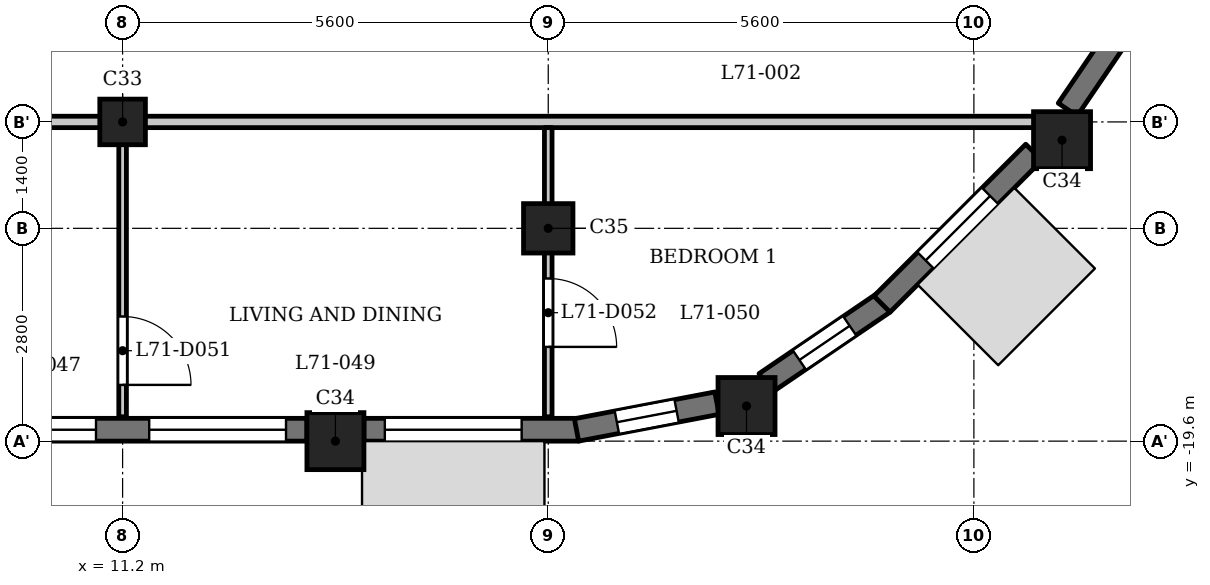
"""IFC4 building model, lengths in metres.
Left out: names, types, materials, properties, quantities, classifications, styles, units other than length and angle.
Written with IfcOpenShell. Run it as: python <this file> out.ifc"""

import sys

from ifc_helpers import new_model, si_unit, direction, frame, frame_2d, origin, origin_2d, place, context, subcontext, project, spatial, rectangle, extrude, element, fill, save


model = new_model("IFC4")
c1 = context("Model", 3, precision=1e-05, world=origin(), true_north=direction((0.0, 1.0)))
c2 = subcontext(c1, "Body", "Model", "MODEL_VIEW")
j1 = project(units=[si_unit("LENGTHUNIT", "METRE"), si_unit("PLANEANGLEUNIT", "RADIAN")], contexts=[c1])
p1 = place(None, origin())
s1 = spatial("IfcSite", under=j1, at=p1, CompositionType="ELEMENT")
p2 = place(p1, origin())
s2 = spatial("IfcBuilding", under=s1, at=p2, CompositionType="ELEMENT")
p3 = place(p2, frame((0.0, 0.0, 273.2)))
s3 = spatial("IfcBuildingStorey", under=s2, at=p3, CompositionType="ELEMENT", Elevation=273.2)
for number, where, z_axis, x_axis in (
    (1, (14.0, -19.6, 0.0), (0.0, 0.0, 1.0), (1.0, 0.0, 0.0)),
    (2, (19.409, -19.138, 0.0), (0.0, 0.0, 1.0), (1.0, 0.0, 0.0)),
    (3, (23.56, -15.64, 0.0), (0.0, 0.0, 1.0), (1.0, 0.0, 0.0)),
):
    element("IfcColumn", number, at=place(p3, frame(where, z_axis=z_axis, x_axis=x_axis)), inside=s3, PredefinedType="COLUMN", context=c2, shape_type="SweptSolid", body=[
        extrude(rectangle(XDim=0.75, YDim=0.75, at=origin_2d()), origin(), (0.0, 0.0, 1.0), 3.5),
    ])
p4 = place(p3, frame((16.8, -16.8, 0.0), z_axis=(0.0, 0.0, 1.0), x_axis=(1.0, 0.0, 0.0)))
e4 = element("IfcColumn", 4, at=p4, inside=s3, PredefinedType="COLUMN", context=c2, shape_type="SweptSolid", body=[
    extrude(rectangle(XDim=0.65, YDim=0.65, at=origin_2d()), origin(), (0.0, 0.0, 1.0), 3.5),
])
p5 = place(p3, frame((11.2, -15.4, 0.0), z_axis=(0.0, 0.0, 1.0), x_axis=(1.0, 0.0, 0.0)))
e5 = element("IfcColumn", 5, at=p5, inside=s3, PredefinedType="COLUMN", context=c2, shape_type="SweptSolid", body=[
    extrude(rectangle(XDim=0.6, YDim=0.6, at=origin_2d()), origin(), (0.0, 0.0, 1.0), 3.5),
])
p6 = place(p3, frame((8.775, -19.45, 0.0), z_axis=(0.0, 0.0, 1.0), x_axis=(1.0, 0.0, 0.0)))
e6 = element("IfcWall", 6, at=p6, inside=s3, PredefinedType="SOLIDWALL", context=c2, shape_type="SweptSolid", body=[
    extrude(rectangle(XDim=4.85, YDim=0.3, at=frame_2d((2.425, 0.0))), origin(), (0.0, 0.0, 1.0), 2.55),
])
p7 = place(p6, frame((0.275, 0.0, 0.9)))
e7 = element("IfcOpeningElement", 7, at=p7, cuts=e6, PredefinedType="OPENING", context=c2, shape_type="SweptSolid", body=[
    extrude(rectangle(XDim=1.8, YDim=1.25, at=frame_2d((0.9, 0.625))), frame((0.0, 0.16, 0.0), z_axis=(0.0, -1.0, 0.0), x_axis=(1.0, 0.0, 0.0)), (0.0, 0.0, 1.0), 0.32),
])
p8 = place(p6, frame((2.775, 0.0, 0.9)))
e8 = element("IfcOpeningElement", 8, at=p8, cuts=e6, PredefinedType="OPENING", context=c2, shape_type="SweptSolid", body=[
    extrude(rectangle(XDim=1.8, YDim=1.25, at=frame_2d((0.9, 0.625))), frame((0.0, 0.16, 0.0), z_axis=(0.0, -1.0, 0.0), x_axis=(1.0, 0.0, 0.0)), (0.0, 0.0, 1.0), 0.32),
])
p9 = place(p3, frame((14.375, -19.45, 0.0), z_axis=(0.0, 0.0, 1.0), x_axis=(1.0, 0.0, 0.0)))
e9 = element("IfcWall", 9, at=p9, inside=s3, PredefinedType="SOLIDWALL", context=c2, shape_type="SweptSolid", body=[
    extrude(rectangle(XDim=2.825, YDim=0.3, at=frame_2d((1.413, 0.0))), origin(), (0.0, 0.0, 1.0), 2.55),
])
p10 = place(p9, frame((0.275, 0.0, 0.9)))
e10 = element("IfcOpeningElement", 10, at=p10, cuts=e9, PredefinedType="OPENING", context=c2, shape_type="SweptSolid", body=[
    extrude(rectangle(XDim=1.8, YDim=1.25, at=frame_2d((0.9, 0.625))), frame((0.0, 0.16, 0.0), z_axis=(0.0, -1.0, 0.0), x_axis=(1.0, 0.0, 0.0)), (0.0, 0.0, 1.0), 0.32),
])
p11 = place(p3, frame((17.172, -19.453, 0.0), z_axis=(0.0, 0.0, 1.0), x_axis=(0.982284001233, 0.187398348234, 0.0)))
e11 = element("IfcWall", 11, at=p11, inside=s3, PredefinedType="SOLIDWALL", context=c2, shape_type="SweptSolid", body=[
    extrude(rectangle(XDim=1.881, YDim=0.3, at=frame_2d((0.941, 0.0))), origin(), (0.0, 0.0, 1.0), 2.55),
])
p12 = place(p11, frame((0.541, 0.0, 0.6)))
e12 = element("IfcOpeningElement", 12, at=p12, cuts=e11, PredefinedType="OPENING", context=c2, shape_type="SweptSolid", body=[
    extrude(rectangle(XDim=0.8, YDim=1.55, at=frame_2d((0.4, 0.775))), frame((0.0, 0.16, 0.0), z_axis=(0.0, -1.0, 0.0), x_axis=(1.0, 0.0, 0.0)), (0.0, 0.0, 1.0), 0.32),
])
p13 = place(p3, frame((19.657, -18.836, 0.0), z_axis=(0.0, 0.0, 1.0), x_axis=(0.82704477487, 0.562136051469, 0.0)))
e13 = element("IfcWall", 13, at=p13, inside=s3, PredefinedType="SOLIDWALL", context=c2, shape_type="SweptSolid", body=[
    extrude(rectangle(XDim=1.881, YDim=0.3, at=frame_2d((0.94, 0.0))), origin(), (0.0, 0.0, 1.0), 2.55),
])
p14 = place(p13, frame((0.541, 0.0, 0.6)))
e14 = element("IfcOpeningElement", 14, at=p14, cuts=e13, PredefinedType="OPENING", context=c2, shape_type="SweptSolid", body=[
    extrude(rectangle(XDim=0.8, YDim=1.55, at=frame_2d((0.4, 0.775))), frame((0.0, 0.16, 0.0), z_axis=(0.0, -1.0, 0.0), x_axis=(1.0, 0.0, 0.0)), (0.0, 0.0, 1.0), 0.32),
])
p15 = place(p3, frame((21.191, -17.797, 0.0), z_axis=(0.0, 0.0, 1.0), x_axis=(0.707106781187, 0.707106781187, 0.0)))
e15 = element("IfcWall", 15, at=p15, inside=s3, PredefinedType="SOLIDWALL", context=c2, shape_type="SweptSolid", body=[
    extrude(rectangle(XDim=2.825, YDim=0.3, at=frame_2d((1.413, 0.0))), origin(), (0.0, 0.0, 1.0), 2.55),
])
p16 = place(p15, frame((0.812, 0.0, 0.6)))
e16 = element("IfcOpeningElement", 16, at=p16, cuts=e15, PredefinedType="OPENING", context=c2, shape_type="SweptSolid", body=[
    extrude(rectangle(XDim=1.2, YDim=1.55, at=frame_2d((0.6, 0.775))), frame((0.0, 0.16, 0.0), z_axis=(0.0, -1.0, 0.0), x_axis=(1.0, 0.0, 0.0)), (0.0, 0.0, 1.0), 0.32),
])
p17 = place(p3, frame((23.634, -15.237, 0.0), z_axis=(0.0, 0.0, 1.0), x_axis=(0.562099454787, 0.827069648173, 0.0)))
e17 = element("IfcWall", 17, at=p17, inside=s3, PredefinedType="SOLIDWALL", context=c2, shape_type="SweptSolid", body=[
    extrude(rectangle(XDim=1.427, YDim=0.3, at=frame_2d((0.714, 0.0))), origin(), (0.0, 0.0, 1.0), 2.55),
])
p18 = place(p3, frame((-23.322, -15.4, 0.0), z_axis=(0.0, 0.0, 1.0), x_axis=(1.0, 0.0, 0.0)))
e18 = element("IfcWall", 18, at=p18, inside=s3, PredefinedType="PARTITIONING", context=c2, shape_type="SweptSolid", body=[
    extrude(rectangle(XDim=46.872, YDim=0.15, at=frame_2d((23.436, 0.0))), origin(), (0.0, 0.0, 1.0), 3.2),
])
p19 = place(p18, frame((8.172, 0.0, 0.0)))
e19 = element("IfcOpeningElement", 19, at=p19, cuts=e18, PredefinedType="OPENING", context=c2, shape_type="SweptSolid", body=[
    extrude(rectangle(XDim=1.0, YDim=2.1, at=frame_2d((0.5, 1.05))), frame((0.0, 0.085, 0.0), z_axis=(0.0, -1.0, 0.0), x_axis=(1.0, 0.0, 0.0)), (0.0, 0.0, 1.0), 0.17),
])
p20 = place(p18, frame((15.172, 0.0, 0.0)))
e20 = element("IfcOpeningElement", 20, at=p20, cuts=e18, PredefinedType="OPENING", context=c2, shape_type="SweptSolid", body=[
    extrude(rectangle(XDim=1.0, YDim=2.1, at=frame_2d((0.5, 1.05))), frame((0.0, 0.085, 0.0), z_axis=(0.0, -1.0, 0.0), x_axis=(1.0, 0.0, 0.0)), (0.0, 0.0, 1.0), 0.17),
])
p21 = place(p18, frame((31.972, 0.0, 0.0)))
e21 = element("IfcOpeningElement", 21, at=p21, cuts=e18, PredefinedType="OPENING", context=c2, shape_type="SweptSolid", body=[
    extrude(rectangle(XDim=1.0, YDim=2.1, at=frame_2d((0.5, 1.05))), frame((0.0, 0.085, 0.0), z_axis=(0.0, -1.0, 0.0), x_axis=(1.0, 0.0, 0.0)), (0.0, 0.0, 1.0), 0.17),
])
p22 = place(p3, frame((11.2, -19.28, 0.0), z_axis=(0.0, 0.0, 1.0), x_axis=(0.0, 1.0, 0.0)))
e22 = element("IfcWall", 22, at=p22, inside=s3, PredefinedType="PARTITIONING", context=c2, shape_type="SweptSolid", body=[
    extrude(rectangle(XDim=3.805, YDim=0.1, at=frame_2d((1.902, 0.0))), origin(), (0.0, 0.0, 1.0), 3.2),
])
p23 = place(p22, frame((0.42, 0.0, 0.0)))
e23 = element("IfcOpeningElement", 23, at=p23, cuts=e22, PredefinedType="OPENING", context=c2, shape_type="SweptSolid", body=[
    extrude(rectangle(XDim=0.9, YDim=2.1, at=frame_2d((0.45, 1.05))), frame((0.0, 0.06, 0.0), z_axis=(0.0, -1.0, 0.0), x_axis=(1.0, 0.0, 0.0)), (0.0, 0.0, 1.0), 0.12),
])
p24 = place(p3, frame((16.8, -19.28, 0.0), z_axis=(0.0, 0.0, 1.0), x_axis=(0.0, 1.0, 0.0)))
e24 = element("IfcWall", 24, at=p24, inside=s3, PredefinedType="PARTITIONING", context=c2, shape_type="SweptSolid", body=[
    extrude(rectangle(XDim=3.805, YDim=0.1, at=frame_2d((1.902, 0.0))), origin(), (0.0, 0.0, 1.0), 3.2),
])
p25 = place(p24, frame((0.92, 0.0, 0.0)))
e25 = element("IfcOpeningElement", 25, at=p25, cuts=e24, PredefinedType="OPENING", context=c2, shape_type="SweptSolid", body=[
    extrude(rectangle(XDim=0.9, YDim=2.1, at=frame_2d((0.45, 1.05))), frame((0.0, 0.06, 0.0), z_axis=(0.0, -1.0, 0.0), x_axis=(1.0, 0.0, 0.0)), (0.0, 0.0, 1.0), 0.12),
])
p26 = place(p23, origin())
e26 = element("IfcDoor", 26, at=p26, inside=s3, OperationType="SINGLE_SWING_LEFT", PredefinedType="DOOR", context=c2, shape_type="SweptSolid", body=[
    extrude(rectangle(XDim=0.9, YDim=2.1, at=frame_2d((0.45, 1.05))), frame((0.0, 0.025, 0.0), z_axis=(0.0, -1.0, 0.0), x_axis=(1.0, 0.0, 0.0)), (0.0, 0.0, 1.0), 0.05),
])
fill(e23, e26)
p27 = place(p25, origin())
e27 = element("IfcDoor", 27, at=p27, inside=s3, OperationType="SINGLE_SWING_LEFT", PredefinedType="DOOR", context=c2, shape_type="SweptSolid", body=[
    extrude(rectangle(XDim=0.9, YDim=2.1, at=frame_2d((0.45, 1.05))), frame((0.0, 0.025, 0.0), z_axis=(0.0, -1.0, 0.0), x_axis=(1.0, 0.0, 0.0)), (0.0, 0.0, 1.0), 0.05),
])
fill(e25, e27)
p28 = place(p7, origin())
e28 = element("IfcWindow", 28, at=p28, inside=s3, PartitioningType="SINGLE_PANEL", PredefinedType="WINDOW", context=c2, shape_type="SweptSolid", body=[
    extrude(rectangle(XDim=1.8, YDim=1.25, at=frame_2d((0.9, 0.625))), frame((0.0, 0.03, 0.0), z_axis=(0.0, -1.0, 0.0), x_axis=(1.0, 0.0, 0.0)), (0.0, 0.0, 1.0), 0.06),
])
fill(e7, e28)
p29 = place(p8, origin())
e29 = element("IfcWindow", 29, at=p29, inside=s3, PartitioningType="SINGLE_PANEL", PredefinedType="WINDOW", context=c2, shape_type="SweptSolid", body=[
    extrude(rectangle(XDim=1.8, YDim=1.25, at=frame_2d((0.9, 0.625))), frame((0.0, 0.03, 0.0), z_axis=(0.0, -1.0, 0.0), x_axis=(1.0, 0.0, 0.0)), (0.0, 0.0, 1.0), 0.06),
])
fill(e8, e29)
p30 = place(p10, origin())
e30 = element("IfcWindow", 30, at=p30, inside=s3, PartitioningType="SINGLE_PANEL", PredefinedType="WINDOW", context=c2, shape_type="SweptSolid", body=[
    extrude(rectangle(XDim=1.8, YDim=1.25, at=frame_2d((0.9, 0.625))), frame((0.0, 0.03, 0.0), z_axis=(0.0, -1.0, 0.0), x_axis=(1.0, 0.0, 0.0)), (0.0, 0.0, 1.0), 0.06),
])
fill(e10, e30)
p31 = place(p12, origin())
e31 = element("IfcWindow", 31, at=p31, inside=s3, PartitioningType="SINGLE_PANEL", PredefinedType="WINDOW", context=c2, shape_type="SweptSolid", body=[
    extrude(rectangle(XDim=0.8, YDim=1.55, at=frame_2d((0.4, 0.775))), frame((0.0, 0.03, 0.0), z_axis=(0.0, -1.0, 0.0), x_axis=(1.0, 0.0, 0.0)), (0.0, 0.0, 1.0), 0.06),
])
fill(e12, e31)
p32 = place(p14, origin())
e32 = element("IfcWindow", 32, at=p32, inside=s3, PartitioningType="SINGLE_PANEL", PredefinedType="WINDOW", context=c2, shape_type="SweptSolid", body=[
    extrude(rectangle(XDim=0.8, YDim=1.55, at=frame_2d((0.4, 0.775))), frame((0.0, 0.03, 0.0), z_axis=(0.0, -1.0, 0.0), x_axis=(1.0, 0.0, 0.0)), (0.0, 0.0, 1.0), 0.06),
])
fill(e14, e32)
p33 = place(p16, origin())
e33 = element("IfcWindow", 33, at=p33, inside=s3, PartitioningType="SINGLE_PANEL", PredefinedType="WINDOW", context=c2, shape_type="SweptSolid", body=[
    extrude(rectangle(XDim=1.2, YDim=1.55, at=frame_2d((0.6, 0.775))), frame((0.0, 0.03, 0.0), z_axis=(0.0, -1.0, 0.0), x_axis=(1.0, 0.0, 0.0)), (0.0, 0.0, 1.0), 0.06),
])
fill(e16, e33)
save(model, sys.argv[1])
